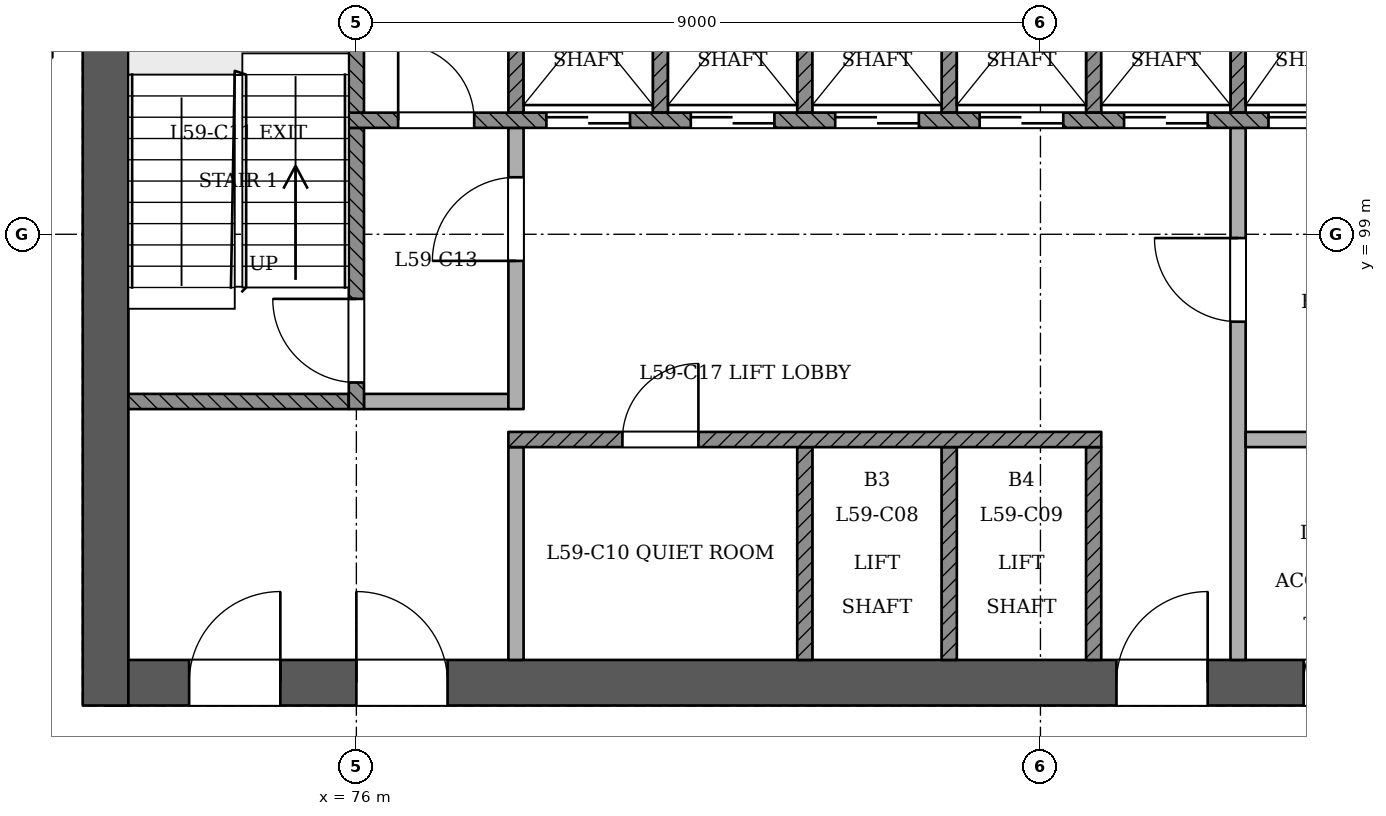
"""IFC4 building model, lengths in metres.
Left out: names, types, materials, properties, quantities, classifications, styles, units other than length and angle.
Written with IfcOpenShell. Run it as: python <this file> out.ifc"""

import sys

from ifc_helpers import new_model, si_unit, direction, frame, frame_2d, origin, place, context, subcontext, project, spatial, rectangle, extrude, element, fill, save


model = new_model("IFC4")
c1 = context("Model", 3, precision=1e-05, world=origin(), true_north=direction((0.0, 1.0)))
c2 = subcontext(c1, "Body", "Model", "MODEL_VIEW")
j1 = project(units=[si_unit("LENGTHUNIT", "METRE"), si_unit("PLANEANGLEUNIT", "RADIAN")], contexts=[c1])
p1 = place(None, origin())
s1 = spatial("IfcSite", under=j1, at=p1, CompositionType="ELEMENT")
p2 = place(p1, origin())
s2 = spatial("IfcBuilding", under=s1, at=p2, CompositionType="ELEMENT")
p3 = place(p2, frame((0.0, 0.0, 230.2)))
s3 = spatial("IfcBuildingStorey", under=s2, at=p3, CompositionType="ELEMENT", Elevation=230.2)
p4 = place(p3, frame((72.7, 93.1, 0.0), z_axis=(0.0, 0.0, 1.0), x_axis=(1.0, 0.0, 0.0)))
e1 = element("IfcWall", 1, at=p4, inside=s3, PredefinedType="SHEAR", context=c2, shape_type="SweptSolid", body=[
    extrude(rectangle(XDim=24.9, YDim=0.6, at=frame_2d((12.45, 0.0))), origin(), (0.0, 0.0, 1.0), 3.6),
])
p5 = place(p4, frame((1.1, 0.0, 0.0)))
e2 = element("IfcOpeningElement", 2, at=p5, cuts=e1, PredefinedType="OPENING", context=c2, shape_type="SweptSolid", body=[
    extrude(rectangle(XDim=1.2, YDim=2.1, at=frame_2d((0.6, 1.05))), frame((0.0, 0.311, 0.0), z_axis=(0.0, -1.0, 0.0), x_axis=(1.0, 0.0, 0.0)), (0.0, 0.0, 1.0), 0.621),
])
p6 = place(p4, frame((3.3, 0.0, 0.0)))
e3 = element("IfcOpeningElement", 3, at=p6, cuts=e1, PredefinedType="OPENING", context=c2, shape_type="SweptSolid", body=[
    extrude(rectangle(XDim=1.2, YDim=2.1, at=frame_2d((0.6, 1.05))), frame((0.0, 0.311, 0.0), z_axis=(0.0, -1.0, 0.0), x_axis=(1.0, 0.0, 0.0)), (0.0, 0.0, 1.0), 0.621),
])
p7 = place(p4, frame((13.3, 0.0, 0.0)))
e4 = element("IfcOpeningElement", 4, at=p7, cuts=e1, PredefinedType="OPENING", context=c2, shape_type="SweptSolid", body=[
    extrude(rectangle(XDim=1.2, YDim=2.1, at=frame_2d((0.6, 1.05))), frame((0.0, 0.311, 0.0), z_axis=(0.0, -1.0, 0.0), x_axis=(1.0, 0.0, 0.0)), (0.0, 0.0, 1.0), 0.621),
])
p8 = place(p4, frame((15.762, 0.0, 0.0)))
e5 = element("IfcOpeningElement", 5, at=p8, cuts=e1, PredefinedType="OPENING", context=c2, shape_type="SweptSolid", body=[
    extrude(rectangle(XDim=1.0, YDim=2.1, at=frame_2d((0.5, 1.05))), frame((0.0, 0.311, 0.0), z_axis=(0.0, -1.0, 0.0), x_axis=(1.0, 0.0, 0.0)), (0.0, 0.0, 1.0), 0.621),
])
p9 = place(p4, frame((18.2, 0.0, 0.0)))
e6 = element("IfcOpeningElement", 6, at=p9, cuts=e1, PredefinedType="OPENING", context=c2, shape_type="SweptSolid", body=[
    extrude(rectangle(XDim=1.0, YDim=2.1, at=frame_2d((0.5, 1.05))), frame((0.0, 0.311, 0.0), z_axis=(0.0, -1.0, 0.0), x_axis=(1.0, 0.0, 0.0)), (0.0, 0.0, 1.0), 0.621),
])
p10 = place(p4, frame((20.55, 0.0, 0.0)))
e7 = element("IfcOpeningElement", 7, at=p10, cuts=e1, PredefinedType="OPENING", context=c2, shape_type="SweptSolid", body=[
    extrude(rectangle(XDim=1.0, YDim=2.1, at=frame_2d((0.5, 1.05))), frame((0.0, 0.311, 0.0), z_axis=(0.0, -1.0, 0.0), x_axis=(1.0, 0.0, 0.0)), (0.0, 0.0, 1.0), 0.621),
])
p11 = place(p4, frame((22.837, 0.0, 0.0)))
e8 = element("IfcOpeningElement", 8, at=p11, cuts=e1, PredefinedType="OPENING", context=c2, shape_type="SweptSolid", body=[
    extrude(rectangle(XDim=1.0, YDim=2.1, at=frame_2d((0.5, 1.05))), frame((0.0, 0.311, 0.0), z_axis=(0.0, -1.0, 0.0), x_axis=(1.0, 0.0, 0.0)), (0.0, 0.0, 1.0), 0.621),
])
p12 = place(p3, frame((72.7, 103.7, 0.0), z_axis=(0.0, 0.0, 1.0), x_axis=(0.0, -1.0, 0.0)))
e9 = element("IfcWall", 9, at=p12, inside=s3, PredefinedType="SHEAR", context=c2, shape_type="SweptSolid", body=[
    extrude(rectangle(XDim=10.9, YDim=0.6, at=frame_2d((5.45, 0.0))), origin(), (0.0, 0.0, 1.0), 3.6),
])
p13 = place(p3, frame((72.0, 101.401, 0.0), z_axis=(0.0, 0.0, 1.0), x_axis=(-1.0, 0.0, 0.0)))
e10 = element("IfcWall", 10, at=p13, inside=s3, PredefinedType="PARTITIONING", context=c2, shape_type="SweptSolid", body=[
    extrude(rectangle(XDim=1.8, YDim=0.15, at=frame_2d((0.9, 0.0))), origin(), (0.0, 0.0, 1.0), 3.2),
])
p14 = place(p3, frame((78.1, 93.4, 0.0), z_axis=(0.0, 0.0, 1.0), x_axis=(0.0, 1.0, 0.0)))
e11 = element("IfcWall", 11, at=p14, inside=s3, PredefinedType="PARTITIONING", context=c2, shape_type="SweptSolid", body=[
    extrude(rectangle(XDim=2.8, YDim=0.2, at=frame_2d((1.4, 0.0))), origin(), (0.0, 0.0, 1.0), 3.2),
])
for number, where, z_axis, x_axis in (
    (12, (81.9, 93.4, 0.0), (0.0, 0.0, 1.0), (0.0, 1.0, 0.0)),
    (13, (83.8, 93.4, 0.0), (0.0, 0.0, 1.0), (0.0, 1.0, 0.0)),
    (14, (85.7, 93.4, 0.0), (0.0, 0.0, 1.0), (0.0, 1.0, 0.0)),
):
    element("IfcWall", number, at=place(p3, frame(where, z_axis=z_axis, x_axis=x_axis)), inside=s3, PredefinedType="SOLIDWALL", context=c2, shape_type="SweptSolid", body=[
        extrude(rectangle(XDim=2.8, YDim=0.2, at=frame_2d((1.4, 0.0))), origin(), (0.0, 0.0, 1.0), 3.2),
    ])
p15 = place(p3, frame((87.6, 93.4, 0.0), z_axis=(0.0, 0.0, 1.0), x_axis=(0.0, 1.0, 0.0)))
e15 = element("IfcWall", 15, at=p15, inside=s3, PredefinedType="PARTITIONING", context=c2, shape_type="SweptSolid", body=[
    extrude(rectangle(XDim=7.0, YDim=0.2, at=frame_2d((3.5, 0.0))), origin(), (0.0, 0.0, 1.0), 3.2),
])
p16 = place(p15, frame((4.45, 0.0, 0.0)))
e16 = element("IfcOpeningElement", 16, at=p16, cuts=e15, PredefinedType="OPENING", context=c2, shape_type="SweptSolid", body=[
    extrude(rectangle(XDim=1.1, YDim=2.1, at=frame_2d((0.55, 1.05))), frame((0.0, 0.11, 0.0), z_axis=(0.0, -1.0, 0.0), x_axis=(1.0, 0.0, 0.0)), (0.0, 0.0, 1.0), 0.221),
])
p17 = place(p3, frame((78.0, 96.3, 0.0), z_axis=(0.0, 0.0, 1.0), x_axis=(1.0, 0.0, 0.0)))
e17 = element("IfcWall", 17, at=p17, inside=s3, PredefinedType="SOLIDWALL", context=c2, shape_type="SweptSolid", body=[
    extrude(rectangle(XDim=7.8, YDim=0.2, at=frame_2d((3.9, 0.0))), origin(), (0.0, 0.0, 1.0), 3.2),
])
p18 = place(p17, frame((1.5, 0.0, 0.0)))
e18 = element("IfcOpeningElement", 18, at=p18, cuts=e17, PredefinedType="OPENING", context=c2, shape_type="SweptSolid", body=[
    extrude(rectangle(XDim=1.0, YDim=2.1, at=frame_2d((0.5, 1.05))), frame((0.0, 0.11, 0.0), z_axis=(0.0, -1.0, 0.0), x_axis=(1.0, 0.0, 0.0)), (0.0, 0.0, 1.0), 0.221),
])
p19 = place(p3, frame((87.7, 96.3, 0.0), z_axis=(0.0, 0.0, 1.0), x_axis=(1.0, 0.0, 0.0)))
e19 = element("IfcWall", 19, at=p19, inside=s3, PredefinedType="PARTITIONING", context=c2, shape_type="SweptSolid", body=[
    extrude(rectangle(XDim=3.6, YDim=0.2, at=frame_2d((1.8, 0.0))), origin(), (0.0, 0.0, 1.0), 3.2),
])
p20 = place(p3, frame((73.0, 96.8, 0.0), z_axis=(0.0, 0.0, 1.0), x_axis=(1.0, 0.0, 0.0)))
e20 = element("IfcWall", 20, at=p20, inside=s3, PredefinedType="SOLIDWALL", context=c2, shape_type="SweptSolid", body=[
    extrude(rectangle(XDim=2.9, YDim=0.2, at=frame_2d((1.45, 0.0))), origin(), (0.0, 0.0, 1.0), 3.2),
])
p21 = place(p3, frame((76.0, 96.7, 0.0), z_axis=(0.0, 0.0, 1.0), x_axis=(0.0, 1.0, 0.0)))
e21 = element("IfcWall", 21, at=p21, inside=s3, PredefinedType="SOLIDWALL", context=c2, shape_type="SweptSolid", body=[
    extrude(rectangle(XDim=3.7, YDim=0.2, at=frame_2d((1.85, 0.0))), origin(), (0.0, 0.0, 1.0), 3.2),
])
p22 = place(p21, frame((0.35, 0.0, 0.0)))
e22 = element("IfcOpeningElement", 22, at=p22, cuts=e21, PredefinedType="OPENING", context=c2, shape_type="SweptSolid", body=[
    extrude(rectangle(XDim=1.1, YDim=2.1, at=frame_2d((0.55, 1.05))), frame((0.0, 0.11, 0.0), z_axis=(0.0, -1.0, 0.0), x_axis=(1.0, 0.0, 0.0)), (0.0, 0.0, 1.0), 0.221),
])
p23 = place(p3, frame((76.1, 96.8, 0.0), z_axis=(0.0, 0.0, 1.0), x_axis=(1.0, 0.0, 0.0)))
e23 = element("IfcWall", 23, at=p23, inside=s3, PredefinedType="PARTITIONING", context=c2, shape_type="SweptSolid", body=[
    extrude(rectangle(XDim=1.9, YDim=0.2, at=frame_2d((0.95, 0.0))), origin(), (0.0, 0.0, 1.0), 3.2),
])
p24 = place(p3, frame((78.1, 96.7, 0.0), z_axis=(0.0, 0.0, 1.0), x_axis=(0.0, 1.0, 0.0)))
e24 = element("IfcWall", 24, at=p24, inside=s3, PredefinedType="PARTITIONING", context=c2, shape_type="SweptSolid", body=[
    extrude(rectangle(XDim=3.7, YDim=0.2, at=frame_2d((1.85, 0.0))), origin(), (0.0, 0.0, 1.0), 3.2),
])
p25 = place(p24, frame((1.95, 0.0, 0.0)))
e25 = element("IfcOpeningElement", 25, at=p25, cuts=e24, PredefinedType="OPENING", context=c2, shape_type="SweptSolid", body=[
    extrude(rectangle(XDim=1.1, YDim=2.1, at=frame_2d((0.55, 1.05))), frame((0.0, 0.11, 0.0), z_axis=(0.0, -1.0, 0.0), x_axis=(1.0, 0.0, 0.0)), (0.0, 0.0, 1.0), 0.221),
])
p26 = place(p3, frame((75.9, 100.5, 0.0), z_axis=(0.0, 0.0, 1.0), x_axis=(1.0, 0.0, 0.0)))
e26 = element("IfcWall", 26, at=p26, inside=s3, PredefinedType="SOLIDWALL", context=c2, shape_type="SweptSolid", body=[
    extrude(rectangle(XDim=18.2, YDim=0.2, at=frame_2d((9.1, 0.0))), origin(), (0.0, 0.0, 1.0), 3.2),
])
p27 = place(p26, frame((2.6, 0.0, 0.0)))
e27 = element("IfcOpeningElement", 27, at=p27, cuts=e26, PredefinedType="OPENING", context=c2, shape_type="SweptSolid", body=[
    extrude(rectangle(XDim=1.1, YDim=2.1, at=frame_2d((0.55, 1.05))), frame((0.0, 0.11, 0.0), z_axis=(0.0, -1.0, 0.0), x_axis=(1.0, 0.0, 0.0)), (0.0, 0.0, 1.0), 0.221),
])
p28 = place(p26, frame((4.5, 0.0, 0.0)))
e28 = element("IfcOpeningElement", 28, at=p28, cuts=e26, PredefinedType="OPENING", context=c2, shape_type="SweptSolid", body=[
    extrude(rectangle(XDim=1.1, YDim=2.1, at=frame_2d((0.55, 1.05))), frame((0.0, 0.11, 0.0), z_axis=(0.0, -1.0, 0.0), x_axis=(1.0, 0.0, 0.0)), (0.0, 0.0, 1.0), 0.221),
])
p29 = place(p26, frame((6.4, 0.0, 0.0)))
e29 = element("IfcOpeningElement", 29, at=p29, cuts=e26, PredefinedType="OPENING", context=c2, shape_type="SweptSolid", body=[
    extrude(rectangle(XDim=1.1, YDim=2.1, at=frame_2d((0.55, 1.05))), frame((0.0, 0.11, 0.0), z_axis=(0.0, -1.0, 0.0), x_axis=(1.0, 0.0, 0.0)), (0.0, 0.0, 1.0), 0.221),
])
p30 = place(p26, frame((8.3, 0.0, 0.0)))
e30 = element("IfcOpeningElement", 30, at=p30, cuts=e26, PredefinedType="OPENING", context=c2, shape_type="SweptSolid", body=[
    extrude(rectangle(XDim=1.1, YDim=2.1, at=frame_2d((0.55, 1.05))), frame((0.0, 0.11, 0.0), z_axis=(0.0, -1.0, 0.0), x_axis=(1.0, 0.0, 0.0)), (0.0, 0.0, 1.0), 0.221),
])
p31 = place(p26, frame((10.2, 0.0, 0.0)))
e31 = element("IfcOpeningElement", 31, at=p31, cuts=e26, PredefinedType="OPENING", context=c2, shape_type="SweptSolid", body=[
    extrude(rectangle(XDim=1.1, YDim=2.1, at=frame_2d((0.55, 1.05))), frame((0.0, 0.11, 0.0), z_axis=(0.0, -1.0, 0.0), x_axis=(1.0, 0.0, 0.0)), (0.0, 0.0, 1.0), 0.221),
])
p32 = place(p26, frame((12.1, 0.0, 0.0)))
e32 = element("IfcOpeningElement", 32, at=p32, cuts=e26, PredefinedType="OPENING", context=c2, shape_type="SweptSolid", body=[
    extrude(rectangle(XDim=1.1, YDim=2.1, at=frame_2d((0.55, 1.05))), frame((0.0, 0.11, 0.0), z_axis=(0.0, -1.0, 0.0), x_axis=(1.0, 0.0, 0.0)), (0.0, 0.0, 1.0), 0.221),
])
p33 = place(p26, frame((14.0, 0.0, 0.0)))
e33 = element("IfcOpeningElement", 33, at=p33, cuts=e26, PredefinedType="OPENING", context=c2, shape_type="SweptSolid", body=[
    extrude(rectangle(XDim=1.1, YDim=2.1, at=frame_2d((0.55, 1.05))), frame((0.0, 0.11, 0.0), z_axis=(0.0, -1.0, 0.0), x_axis=(1.0, 0.0, 0.0)), (0.0, 0.0, 1.0), 0.221),
])
p34 = place(p26, frame((0.65, 0.0, 0.0)))
e34 = element("IfcOpeningElement", 34, at=p34, cuts=e26, PredefinedType="OPENING", context=c2, shape_type="SweptSolid", body=[
    extrude(rectangle(XDim=1.0, YDim=2.1, at=frame_2d((0.5, 1.05))), frame((0.0, 0.11, 0.0), z_axis=(0.0, -1.0, 0.0), x_axis=(1.0, 0.0, 0.0)), (0.0, 0.0, 1.0), 0.221),
])
p35 = place(p26, frame((16.3, 0.0, 0.0)))
e35 = element("IfcOpeningElement", 35, at=p35, cuts=e26, PredefinedType="OPENING", context=c2, shape_type="SweptSolid", body=[
    extrude(rectangle(XDim=1.0, YDim=2.1, at=frame_2d((0.5, 1.05))), frame((0.0, 0.11, 0.0), z_axis=(0.0, -1.0, 0.0), x_axis=(1.0, 0.0, 0.0)), (0.0, 0.0, 1.0), 0.221),
])
for number, where, z_axis, x_axis in (
    (36, (76.0, 100.6, 0.0), (0.0, 0.0, 1.0), (0.0, 1.0, 0.0)),
    (37, (78.1, 100.6, 0.0), (0.0, 0.0, 1.0), (0.0, 1.0, 0.0)),
    (38, (80.0, 100.6, 0.0), (0.0, 0.0, 1.0), (0.0, 1.0, 0.0)),
    (39, (81.9, 100.6, 0.0), (0.0, 0.0, 1.0), (0.0, 1.0, 0.0)),
    (40, (83.8, 100.6, 0.0), (0.0, 0.0, 1.0), (0.0, 1.0, 0.0)),
    (41, (85.7, 100.6, 0.0), (0.0, 0.0, 1.0), (0.0, 1.0, 0.0)),
    (42, (87.6, 100.6, 0.0), (0.0, 0.0, 1.0), (0.0, 1.0, 0.0)),
):
    element("IfcWall", number, at=place(p3, frame(where, z_axis=z_axis, x_axis=x_axis)), inside=s3, PredefinedType="SOLIDWALL", context=c2, shape_type="SweptSolid", body=[
        extrude(rectangle(XDim=2.8, YDim=0.2, at=frame_2d((1.4, 0.0))), origin(), (0.0, 0.0, 1.0), 3.2),
    ])
p36 = place(p27, origin())
e43 = element("IfcDoor", 43, at=p36, inside=s3, OperationType="SLIDING_TO_RIGHT", PredefinedType="NOTDEFINED", context=c2, shape_type="SweptSolid", body=[
    extrude(rectangle(XDim=1.1, YDim=2.1, at=frame_2d((0.55, 1.05))), frame((0.0, 0.025, 0.0), z_axis=(0.0, -1.0, 0.0), x_axis=(1.0, 0.0, 0.0)), (0.0, 0.0, 1.0), 0.05),
])
fill(e27, e43)
p37 = place(p28, origin())
e44 = element("IfcDoor", 44, at=p37, inside=s3, OperationType="SLIDING_TO_LEFT", PredefinedType="NOTDEFINED", context=c2, shape_type="SweptSolid", body=[
    extrude(rectangle(XDim=1.1, YDim=2.1, at=frame_2d((0.55, 1.05))), frame((0.0, 0.025, 0.0), z_axis=(0.0, -1.0, 0.0), x_axis=(1.0, 0.0, 0.0)), (0.0, 0.0, 1.0), 0.05),
])
fill(e28, e44)
p38 = place(p29, origin())
e45 = element("IfcDoor", 45, at=p38, inside=s3, OperationType="SLIDING_TO_RIGHT", PredefinedType="NOTDEFINED", context=c2, shape_type="SweptSolid", body=[
    extrude(rectangle(XDim=1.1, YDim=2.1, at=frame_2d((0.55, 1.05))), frame((0.0, 0.025, 0.0), z_axis=(0.0, -1.0, 0.0), x_axis=(1.0, 0.0, 0.0)), (0.0, 0.0, 1.0), 0.05),
])
fill(e29, e45)
p39 = place(p30, origin())
e46 = element("IfcDoor", 46, at=p39, inside=s3, OperationType="SLIDING_TO_LEFT", PredefinedType="NOTDEFINED", context=c2, shape_type="SweptSolid", body=[
    extrude(rectangle(XDim=1.1, YDim=2.1, at=frame_2d((0.55, 1.05))), frame((0.0, 0.025, 0.0), z_axis=(0.0, -1.0, 0.0), x_axis=(1.0, 0.0, 0.0)), (0.0, 0.0, 1.0), 0.05),
])
fill(e30, e46)
p40 = place(p31, origin())
e47 = element("IfcDoor", 47, at=p40, inside=s3, OperationType="SLIDING_TO_RIGHT", PredefinedType="NOTDEFINED", context=c2, shape_type="SweptSolid", body=[
    extrude(rectangle(XDim=1.1, YDim=2.1, at=frame_2d((0.55, 1.05))), frame((0.0, 0.025, 0.0), z_axis=(0.0, -1.0, 0.0), x_axis=(1.0, 0.0, 0.0)), (0.0, 0.0, 1.0), 0.05),
])
fill(e31, e47)
p41 = place(p32, origin())
e48 = element("IfcDoor", 48, at=p41, inside=s3, OperationType="SLIDING_TO_RIGHT", PredefinedType="NOTDEFINED", context=c2, shape_type="SweptSolid", body=[
    extrude(rectangle(XDim=1.1, YDim=2.1, at=frame_2d((0.55, 1.05))), frame((0.0, 0.025, 0.0), z_axis=(0.0, -1.0, 0.0), x_axis=(1.0, 0.0, 0.0)), (0.0, 0.0, 1.0), 0.05),
])
fill(e32, e48)
p42 = place(p22, origin())
e49 = element("IfcDoor", 49, at=p42, inside=s3, OperationType="SINGLE_SWING_RIGHT", PredefinedType="NOTDEFINED", context=c2, shape_type="SweptSolid", body=[
    extrude(rectangle(XDim=1.1, YDim=2.1, at=frame_2d((0.55, 1.05))), frame((0.0, 0.025, 0.0), z_axis=(0.0, -1.0, 0.0), x_axis=(1.0, 0.0, 0.0)), (0.0, 0.0, 1.0), 0.05),
])
fill(e22, e49)
p43 = place(p25, origin())
e50 = element("IfcDoor", 50, at=p43, inside=s3, OperationType="SINGLE_SWING_LEFT", PredefinedType="NOTDEFINED", context=c2, shape_type="SweptSolid", body=[
    extrude(rectangle(XDim=1.1, YDim=2.1, at=frame_2d((0.55, 1.05))), frame((0.0, 0.025, 0.0), z_axis=(0.0, -1.0, 0.0), x_axis=(1.0, 0.0, 0.0)), (0.0, 0.0, 1.0), 0.05),
])
fill(e25, e50)
p44 = place(p16, origin())
e51 = element("IfcDoor", 51, at=p44, inside=s3, OperationType="SINGLE_SWING_RIGHT", PredefinedType="NOTDEFINED", context=c2, shape_type="SweptSolid", body=[
    extrude(rectangle(XDim=1.1, YDim=2.1, at=frame_2d((0.55, 1.05))), frame((0.0, 0.025, 0.0), z_axis=(0.0, -1.0, 0.0), x_axis=(1.0, 0.0, 0.0)), (0.0, 0.0, 1.0), 0.05),
])
fill(e16, e51)
p45 = place(p5, origin())
e52 = element("IfcDoor", 52, at=p45, inside=s3, OperationType="SINGLE_SWING_RIGHT", PredefinedType="NOTDEFINED", context=c2, shape_type="SweptSolid", body=[
    extrude(rectangle(XDim=1.2, YDim=2.1, at=frame_2d((0.6, 1.05))), frame((0.0, 0.025, 0.0), z_axis=(0.0, -1.0, 0.0), x_axis=(1.0, 0.0, 0.0)), (0.0, 0.0, 1.0), 0.05),
])
fill(e2, e52)
p46 = place(p6, origin())
e53 = element("IfcDoor", 53, at=p46, inside=s3, OperationType="SINGLE_SWING_LEFT", PredefinedType="NOTDEFINED", context=c2, shape_type="SweptSolid", body=[
    extrude(rectangle(XDim=1.2, YDim=2.1, at=frame_2d((0.6, 1.05))), frame((0.0, 0.025, 0.0), z_axis=(0.0, -1.0, 0.0), x_axis=(1.0, 0.0, 0.0)), (0.0, 0.0, 1.0), 0.05),
])
fill(e3, e53)
p47 = place(p7, origin())
e54 = element("IfcDoor", 54, at=p47, inside=s3, OperationType="SINGLE_SWING_RIGHT", PredefinedType="NOTDEFINED", context=c2, shape_type="SweptSolid", body=[
    extrude(rectangle(XDim=1.2, YDim=2.1, at=frame_2d((0.6, 1.05))), frame((0.0, 0.025, 0.0), z_axis=(0.0, -1.0, 0.0), x_axis=(1.0, 0.0, 0.0)), (0.0, 0.0, 1.0), 0.05),
])
fill(e4, e54)
p48 = place(p34, origin())
e55 = element("IfcDoor", 55, at=p48, inside=s3, OperationType="SINGLE_SWING_LEFT", PredefinedType="NOTDEFINED", context=c2, shape_type="SweptSolid", body=[
    extrude(rectangle(XDim=1.0, YDim=2.1, at=frame_2d((0.5, 1.05))), frame((0.0, 0.025, 0.0), z_axis=(0.0, -1.0, 0.0), x_axis=(1.0, 0.0, 0.0)), (0.0, 0.0, 1.0), 0.05),
])
fill(e34, e55)
p49 = place(p8, origin())
e56 = element("IfcDoor", 56, at=p49, inside=s3, OperationType="SINGLE_SWING_RIGHT", PredefinedType="NOTDEFINED", context=c2, shape_type="SweptSolid", body=[
    extrude(rectangle(XDim=1.0, YDim=2.1, at=frame_2d((0.5, 1.05))), frame((0.0, 0.025, 0.0), z_axis=(0.0, -1.0, 0.0), x_axis=(1.0, 0.0, 0.0)), (0.0, 0.0, 1.0), 0.05),
])
fill(e5, e56)
p50 = place(p18, origin())
e57 = element("IfcDoor", 57, at=p50, inside=s3, OperationType="SINGLE_SWING_RIGHT", PredefinedType="NOTDEFINED", context=c2, shape_type="SweptSolid", body=[
    extrude(rectangle(XDim=1.0, YDim=2.1, at=frame_2d((0.5, 1.05))), frame((0.0, 0.025, 0.0), z_axis=(0.0, -1.0, 0.0), x_axis=(1.0, 0.0, 0.0)), (0.0, 0.0, 1.0), 0.05),
])
fill(e18, e57)
save(model, sys.argv[1])
